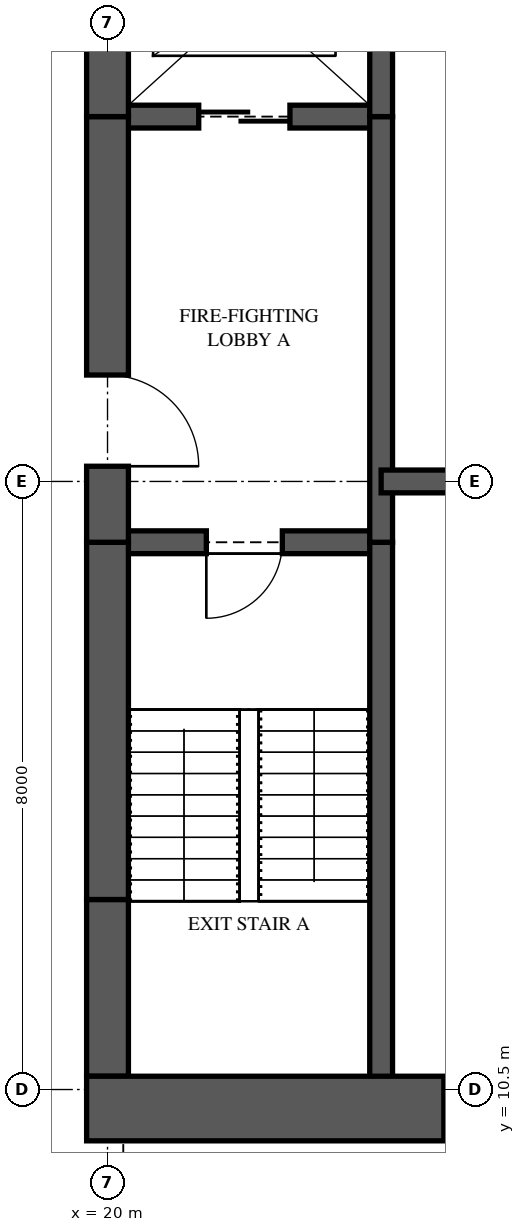
"""IFC4 building model, lengths in metres.
Left out: names, types, materials, properties, quantities, classifications, styles, units other than length and angle.
Written with IfcOpenShell. Run it as: python <this file> out.ifc"""

import sys

from ifc_helpers import new_model, si_unit, direction, frame, frame_2d, origin, place, context, subcontext, project, spatial, rectangle, extrude, element, fill, save


model = new_model("IFC4")
c1 = context("Model", 3, precision=1e-05, world=origin(), true_north=direction((0.0, 1.0)))
c2 = subcontext(c1, "Body", "Model", "MODEL_VIEW")
j1 = project(units=[si_unit("LENGTHUNIT", "METRE"), si_unit("PLANEANGLEUNIT", "RADIAN")], contexts=[c1])
p1 = place(None, origin())
s1 = spatial("IfcSite", under=j1, at=p1, CompositionType="ELEMENT")
p2 = place(p1, origin())
s2 = spatial("IfcBuilding", under=s1, at=p2, CompositionType="ELEMENT")
p3 = place(p2, frame((0.0, 0.0, 272.75)))
s3 = spatial("IfcBuildingStorey", under=s2, at=p3, CompositionType="ELEMENT", Elevation=272.75)
p4 = place(p3, frame((19.725, 10.25, 0.0), z_axis=(0.0, 0.0, 1.0), x_axis=(1.0, 0.0, 0.0)))
e1 = element("IfcWall", 1, at=p4, inside=s3, PredefinedType="SHEAR", context=c2, shape_type="SweptSolid", body=[
    extrude(rectangle(XDim=6.275, YDim=0.85, at=frame_2d((3.137, 0.0))), origin(), (0.0, 0.0, 1.0), 5.0),
])
p5 = place(p4, frame((4.7, 0.0, 0.0)))
e2 = element("IfcOpeningElement", 2, at=p5, cuts=e1, PredefinedType="OPENING", context=c2, shape_type="SweptSolid", body=[
    extrude(rectangle(XDim=0.75, YDim=2.1, at=frame_2d((0.375, 1.05))), frame((0.0, 0.435, 0.0), z_axis=(0.0, -1.0, 0.0), x_axis=(1.0, 0.0, 0.0)), (0.0, 0.0, 1.0), 0.87),
])
p6 = place(p3, frame((20.0, 26.325, 0.0), z_axis=(0.0, 0.0, 1.0), x_axis=(0.0, -1.0, 0.0)))
e3 = element("IfcWall", 3, at=p6, inside=s3, PredefinedType="SHEAR", context=c2, shape_type="SweptSolid", body=[
    extrude(rectangle(XDim=3.025, YDim=0.55, at=frame_2d((1.512, 0.0))), origin(), (0.0, 0.0, 1.0), 5.0),
])
p7 = place(p3, frame((20.0, 23.3, 0.0), z_axis=(0.0, 0.0, 1.0), x_axis=(0.0, -1.0, 0.0)))
e4 = element("IfcWall", 4, at=p7, inside=s3, PredefinedType="SHEAR", context=c2, shape_type="SweptSolid", body=[
    extrude(rectangle(XDim=5.6, YDim=0.55, at=frame_2d((2.8, 0.0))), origin(), (0.0, 0.0, 1.0), 5.0),
])
p8 = place(p7, frame((3.4, 0.0, 0.0)))
e5 = element("IfcOpeningElement", 5, at=p8, cuts=e4, PredefinedType="OPENING", context=c2, shape_type="SweptSolid", body=[
    extrude(rectangle(XDim=1.2, YDim=2.2, at=frame_2d((0.6, 1.1))), frame((0.0, 0.285, 0.0), z_axis=(0.0, -1.0, 0.0), x_axis=(1.0, 0.0, 0.0)), (0.0, 0.0, 1.0), 0.57),
])
p9 = place(p3, frame((20.0, 17.7, 0.0), z_axis=(0.0, 0.0, 1.0), x_axis=(0.0, -1.0, 0.0)))
e6 = element("IfcWall", 6, at=p9, inside=s3, PredefinedType="SHEAR", context=c2, shape_type="SweptSolid", body=[
    extrude(rectangle(XDim=4.7, YDim=0.55, at=frame_2d((2.35, 0.0))), origin(), (0.0, 0.0, 1.0), 5.0),
])
p10 = place(p3, frame((20.0, 13.0, 0.0), z_axis=(0.0, 0.0, 1.0), x_axis=(0.0, -1.0, 0.0)))
e7 = element("IfcWall", 7, at=p10, inside=s3, PredefinedType="SHEAR", context=c2, shape_type="SweptSolid", body=[
    extrude(rectangle(XDim=2.325, YDim=0.55, at=frame_2d((1.163, 0.0))), origin(), (0.0, 0.0, 1.0), 5.0),
])
p11 = place(p3, frame((23.6, 10.25, 0.0), z_axis=(0.0, 0.0, 1.0), x_axis=(0.0, 1.0, 0.0)))
e8 = element("IfcWall", 8, at=p11, inside=s3, PredefinedType="SHEAR", context=c2, shape_type="SweptSolid", body=[
    extrude(rectangle(XDim=7.45, YDim=0.3, at=frame_2d((3.725, 0.0))), origin(), (0.0, 0.0, 1.0), 5.0),
])
p12 = place(p3, frame((23.6, 17.7, 0.0), z_axis=(0.0, 0.0, 1.0), x_axis=(0.0, 1.0, 0.0)))
e9 = element("IfcWall", 9, at=p12, inside=s3, PredefinedType="SHEAR", context=c2, shape_type="SweptSolid", body=[
    extrude(rectangle(XDim=5.6, YDim=0.3, at=frame_2d((2.8, 0.0))), origin(), (0.0, 0.0, 1.0), 5.0),
])
p13 = place(p3, frame((23.6, 23.3, 0.0), z_axis=(0.0, 0.0, 1.0), x_axis=(0.0, 1.0, 0.0)))
e10 = element("IfcWall", 10, at=p13, inside=s3, PredefinedType="SHEAR", context=c2, shape_type="SweptSolid", body=[
    extrude(rectangle(XDim=3.45, YDim=0.3, at=frame_2d((1.725, 0.0))), origin(), (0.0, 0.0, 1.0), 5.0),
])
p14 = place(p3, frame((20.0, 17.7, 0.0), z_axis=(0.0, 0.0, 1.0), x_axis=(1.0, 0.0, 0.0)))
e11 = element("IfcWall", 11, at=p14, inside=s3, PredefinedType="SHEAR", context=c2, shape_type="SweptSolid", body=[
    extrude(rectangle(XDim=3.6, YDim=0.3, at=frame_2d((1.8, 0.0))), origin(), (0.0, 0.0, 1.0), 5.0),
])
p15 = place(p14, frame((1.3, 0.0, 0.0)))
e12 = element("IfcOpeningElement", 12, at=p15, cuts=e11, PredefinedType="OPENING", context=c2, shape_type="SweptSolid", body=[
    extrude(rectangle(XDim=1.0, YDim=2.1, at=frame_2d((0.5, 1.05))), frame((0.0, 0.16, 0.0), z_axis=(0.0, -1.0, 0.0), x_axis=(1.0, 0.0, 0.0)), (0.0, 0.0, 1.0), 0.32),
])
p16 = place(p3, frame((20.0, 23.3, 0.0), z_axis=(0.0, 0.0, 1.0), x_axis=(1.0, 0.0, 0.0)))
e13 = element("IfcWall", 13, at=p16, inside=s3, PredefinedType="SHEAR", context=c2, shape_type="SweptSolid", body=[
    extrude(rectangle(XDim=3.6, YDim=0.3, at=frame_2d((1.8, 0.0))), origin(), (0.0, 0.0, 1.0), 5.0),
])
p17 = place(p16, frame((1.2, 0.0, 0.0)))
e14 = element("IfcOpeningElement", 14, at=p17, cuts=e13, PredefinedType="OPENING", context=c2, shape_type="SweptSolid", body=[
    extrude(rectangle(XDim=1.2, YDim=2.1, at=frame_2d((0.6, 1.05))), frame((0.0, 0.16, 0.0), z_axis=(0.0, -1.0, 0.0), x_axis=(1.0, 0.0, 0.0)), (0.0, 0.0, 1.0), 0.32),
])
p18 = place(p3, frame((23.6, 18.5, 0.0), z_axis=(0.0, 0.0, 1.0), x_axis=(1.0, 0.0, 0.0)))
e15 = element("IfcWall", 15, at=p18, inside=s3, PredefinedType="SHEAR", context=c2, shape_type="SweptSolid", body=[
    extrude(rectangle(XDim=2.4, YDim=0.3, at=frame_2d((1.2, 0.0))), origin(), (0.0, 0.0, 1.0), 5.0),
])
p19 = place(p15, frame((1.0, 0.0, 0.0), z_axis=(0.0, 0.0, 1.0), x_axis=(-1.0, 0.0, 0.0)))
e16 = element("IfcDoor", 16, at=p19, inside=s3, OperationType="SINGLE_SWING_RIGHT", PredefinedType="DOOR", context=c2, shape_type="SweptSolid", body=[
    extrude(rectangle(XDim=1.0, YDim=2.1, at=frame_2d((0.5, 1.05))), frame((0.0, 0.025, 0.0), z_axis=(0.0, -1.0, 0.0), x_axis=(1.0, 0.0, 0.0)), (0.0, 0.0, 1.0), 0.05),
])
fill(e12, e16)
p20 = place(p8, origin())
e17 = element("IfcDoor", 17, at=p20, inside=s3, OperationType="SINGLE_SWING_RIGHT", PredefinedType="DOOR", context=c2, shape_type="SweptSolid", body=[
    extrude(rectangle(XDim=1.2, YDim=2.2, at=frame_2d((0.6, 1.1))), frame((0.0, 0.025, 0.0), z_axis=(0.0, -1.0, 0.0), x_axis=(1.0, 0.0, 0.0)), (0.0, 0.0, 1.0), 0.05),
])
fill(e5, e17)
p21 = place(p17, origin())
e18 = element("IfcDoor", 18, at=p21, inside=s3, OperationType="SLIDING_TO_LEFT", PredefinedType="DOOR", context=c2, shape_type="SweptSolid", body=[
    extrude(rectangle(XDim=1.2, YDim=2.1, at=frame_2d((0.6, 1.05))), frame((0.0, 0.025, 0.0), z_axis=(0.0, -1.0, 0.0), x_axis=(1.0, 0.0, 0.0)), (0.0, 0.0, 1.0), 0.05),
])
fill(e14, e18)
p22 = place(p5, origin())
e19 = element("IfcDoor", 19, at=p22, inside=s3, OperationType="SINGLE_SWING_RIGHT", PredefinedType="DOOR", context=c2, shape_type="SweptSolid", body=[
    extrude(rectangle(XDim=0.75, YDim=2.1, at=frame_2d((0.375, 1.05))), frame((0.0, 0.025, 0.0), z_axis=(0.0, -1.0, 0.0), x_axis=(1.0, 0.0, 0.0)), (0.0, 0.0, 1.0), 0.05),
])
fill(e2, e19)
save(model, sys.argv[1])
